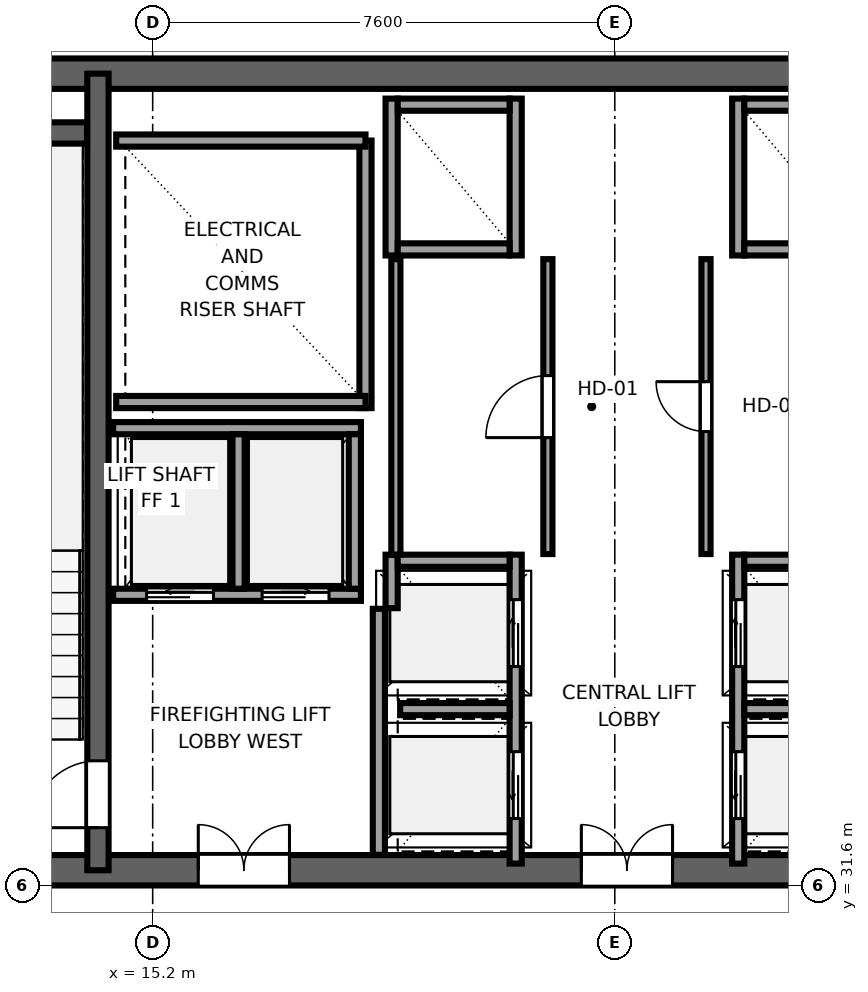
"""IFC4 building model, lengths in metres.
Left out: names, types, materials, properties, quantities, classifications, styles, units other than length and angle.
Written with IfcOpenShell. Run it as: python <this file> out.ifc"""

import sys

from ifc_helpers import new_model, si_unit, direction, frame, frame_2d, origin, place, context, subcontext, project, spatial, rectangle, extrude, source, transform, mapped, element, fill, save


model = new_model("IFC4")
c1 = context("Model", 3, precision=1e-05, world=origin(), true_north=direction((0.0, 1.0)))
c2 = subcontext(c1, "Body", "Model", "MODEL_VIEW")
j1 = project(units=[si_unit("LENGTHUNIT", "METRE"), si_unit("PLANEANGLEUNIT", "RADIAN")], contexts=[c1])
p1 = place(None, origin())
s1 = spatial("IfcSite", under=j1, at=p1, CompositionType="ELEMENT")
p2 = place(p1, origin())
s2 = spatial("IfcBuilding", under=s1, at=p2, CompositionType="ELEMENT")
p3 = place(p2, frame((0.0, 0.0, 259.4)))
s3 = spatial("IfcBuildingStorey", under=s2, at=p3, CompositionType="ELEMENT", Elevation=259.4)
p4 = place(p3, frame((10.0, 31.85, 0.0), z_axis=(0.0, 0.0, 1.0), x_axis=(1.0, 0.0, 0.0)))
e1 = element("IfcWall", 1, at=p4, inside=s3, PredefinedType="SHEAR", context=c2, shape_type="SweptSolid", body=[
    extrude(rectangle(XDim=26.0, YDim=0.5, at=frame_2d((13.0, 0.0))), origin(), (0.0, 0.0, 1.0), 3.55),
])
p5 = place(p4, frame((7.45, 0.0, 0.0), z_axis=(0.0, 0.0, 1.0), x_axis=(-1.0, 0.0, 0.0)))
e2 = element("IfcOpeningElement", 2, at=p5, cuts=e1, PredefinedType="OPENING", context=c2, shape_type="SweptSolid", body=[
    extrude(rectangle(XDim=1.5, YDim=2.04, at=frame_2d((0.75, 1.02))), frame((0.0, 0.26, 0.0), z_axis=(0.0, -1.0, 0.0), x_axis=(1.0, 0.0, 0.0)), (0.0, 0.0, 1.0), 0.52),
])
p6 = place(p4, frame((13.75, 0.0, 0.0), z_axis=(0.0, 0.0, 1.0), x_axis=(-1.0, 0.0, 0.0)))
e3 = element("IfcOpeningElement", 3, at=p6, cuts=e1, PredefinedType="OPENING", context=c2, shape_type="SweptSolid", body=[
    extrude(rectangle(XDim=1.5, YDim=2.04, at=frame_2d((0.75, 1.02))), frame((0.0, 0.26, 0.0), z_axis=(0.0, -1.0, 0.0), x_axis=(1.0, 0.0, 0.0)), (0.0, 0.0, 1.0), 0.52),
])
p7 = place(p4, frame((20.05, 0.0, 0.0), z_axis=(0.0, 0.0, 1.0), x_axis=(-1.0, 0.0, 0.0)))
e4 = element("IfcOpeningElement", 4, at=p7, cuts=e1, PredefinedType="OPENING", context=c2, shape_type="SweptSolid", body=[
    extrude(rectangle(XDim=1.5, YDim=2.04, at=frame_2d((0.75, 1.02))), frame((0.0, 0.26, 0.0), z_axis=(0.0, -1.0, 0.0), x_axis=(1.0, 0.0, 0.0)), (0.0, 0.0, 1.0), 0.52),
])
p8 = place(p3, frame((10.0, 44.95, 0.0), z_axis=(0.0, 0.0, 1.0), x_axis=(1.0, 0.0, 0.0)))
e5 = element("IfcWall", 5, at=p8, inside=s3, PredefinedType="SHEAR", context=c2, shape_type="SweptSolid", body=[
    extrude(rectangle(XDim=26.0, YDim=0.5, at=frame_2d((13.0, 0.0))), origin(), (0.0, 0.0, 1.0), 3.55),
])
p9 = place(p3, frame((14.3, 31.85, 0.0), z_axis=(0.0, 0.0, 1.0), x_axis=(0.0, 1.0, 0.0)))
e6 = element("IfcWall", 6, at=p9, inside=s3, PredefinedType="SHEAR", context=c2, shape_type="SweptSolid", body=[
    extrude(rectangle(XDim=13.1, YDim=0.35, at=frame_2d((6.55, 0.0))), origin(), (0.0, 0.0, 1.0), 3.55),
])
p10 = place(p9, frame((0.7, 0.0, 0.0)))
e7 = element("IfcOpeningElement", 7, at=p10, cuts=e6, PredefinedType="OPENING", context=c2, shape_type="SweptSolid", body=[
    extrude(rectangle(XDim=1.1, YDim=2.12, at=frame_2d((0.55, 1.06))), frame((0.0, 0.185, 0.0), z_axis=(0.0, -1.0, 0.0), x_axis=(1.0, 0.0, 0.0)), (0.0, 0.0, 1.0), 0.37),
])
p11 = place(p3, frame((10.52, 43.975, 0.0), z_axis=(0.0, 0.0, 1.0), x_axis=(1.0, 0.0, 0.0)))
e8 = element("IfcWall", 8, at=p11, inside=s3, PredefinedType="SHEAR", context=c2, shape_type="SweptSolid", body=[
    extrude(rectangle(XDim=3.6, YDim=0.35, at=frame_2d((1.8, 0.0))), origin(), (0.0, 0.0, 1.0), 3.55),
])
p12 = place(p3, frame((18.7, 39.45, 0.0), z_axis=(0.0, 0.0, 1.0), x_axis=(0.0, 1.0, 0.0)))
e9 = element("IfcWall", 9, at=p12, inside=s3, PredefinedType="SOLIDWALL", context=c2, shape_type="SweptSolid", body=[
    extrude(rectangle(XDim=4.4, YDim=0.2, at=frame_2d((2.2, 0.0))), origin(), (0.0, 0.0, 1.0), 3.37),
])
for number, where, z_axis, x_axis in (
    (10, (14.6, 39.55, 0.0), (0.0, 0.0, 1.0), (1.0, 0.0, 0.0)),
    (11, (14.6, 43.85, 0.0), (0.0, 0.0, 1.0), (1.0, 0.0, 0.0)),
):
    element("IfcWall", number, at=place(p3, frame(where, z_axis=z_axis, x_axis=x_axis)), inside=s3, PredefinedType="SOLIDWALL", context=c2, shape_type="SweptSolid", body=[
        extrude(rectangle(XDim=4.1, YDim=0.2, at=frame_2d((2.05, 0.0))), origin(), (0.0, 0.0, 1.0), 3.37),
    ])
p13 = place(p3, frame((18.92, 32.104, 0.0), z_axis=(0.0, 0.0, 1.0), x_axis=(0.0, 1.0, 0.0)))
e12 = element("IfcWall", 12, at=p13, inside=s3, PredefinedType="SOLIDWALL", context=c2, shape_type="SweptSolid", body=[
    extrude(rectangle(XDim=4.046, YDim=0.2, at=frame_2d((2.023, 0.0))), origin(), (0.0, 0.0, 1.0), 3.37),
])
p14 = place(p3, frame((21.17, 31.96, 0.0), z_axis=(0.0, 0.0, 1.0), x_axis=(0.0, 1.0, 0.0)))
e13 = element("IfcWall", 13, at=p14, inside=s3, PredefinedType="SOLIDWALL", context=c2, shape_type="SweptSolid", body=[
    extrude(rectangle(XDim=5.08, YDim=0.2, at=frame_2d((2.54, 0.0))), origin(), (0.0, 0.0, 1.0), 3.37),
])
p15 = place(p14, frame((0.74, 0.0, 0.0)))
e14 = element("IfcOpeningElement", 14, at=p15, cuts=e13, PredefinedType="OPENING", context=c2, shape_type="SweptSolid", body=[
    extrude(rectangle(XDim=1.1, YDim=2.12, at=frame_2d((0.55, 1.06))), frame((0.0, 0.11, 0.0), z_axis=(0.0, -1.0, 0.0), x_axis=(1.0, 0.0, 0.0)), (0.0, 0.0, 1.0), 0.22),
])
p16 = place(p14, frame((3.24, 0.0, 0.0)))
e15 = element("IfcOpeningElement", 15, at=p16, cuts=e13, PredefinedType="OPENING", context=c2, shape_type="SweptSolid", body=[
    extrude(rectangle(XDim=1.1, YDim=2.12, at=frame_2d((0.55, 1.06))), frame((0.0, 0.11, 0.0), z_axis=(0.0, -1.0, 0.0), x_axis=(1.0, 0.0, 0.0)), (0.0, 0.0, 1.0), 0.22),
])
p17 = place(p3, frame((19.13, 36.16, 0.0), z_axis=(0.0, 0.0, 1.0), x_axis=(0.0, 1.0, 0.0)))
e16 = element("IfcWall", 16, at=p17, inside=s3, PredefinedType="SOLIDWALL", context=c2, shape_type="SweptSolid", body=[
    extrude(rectangle(XDim=0.88, YDim=0.2, at=frame_2d((0.44, 0.0))), origin(), (0.0, 0.0, 1.0), 3.37),
])
p18 = place(p3, frame((19.23, 36.94, 0.0), z_axis=(0.0, 0.0, 1.0), x_axis=(1.0, 0.0, 0.0)))
e17 = element("IfcWall", 17, at=p18, inside=s3, PredefinedType="SOLIDWALL", context=c2, shape_type="SweptSolid", body=[
    extrude(rectangle(XDim=1.84, YDim=0.2, at=frame_2d((0.92, 0.0))), origin(), (0.0, 0.0, 1.0), 3.37),
])
p19 = place(p3, frame((19.27, 34.5, 0.0), z_axis=(0.0, 0.0, 1.0), x_axis=(1.0, 0.0, 0.0)))
e18 = element("IfcWall", 18, at=p19, inside=s3, PredefinedType="SOLIDWALL", context=c2, shape_type="SweptSolid", body=[
    extrude(rectangle(XDim=1.8, YDim=0.2, at=frame_2d((0.9, 0.0))), origin(), (0.0, 0.0, 1.0), 3.37),
])
for number, where, z_axis, x_axis in (
    (19, (21.17, 41.96, 0.0), (0.0, 0.0, 1.0), (0.0, 1.0, 0.0)),
    (20, (19.13, 41.96, 0.0), (0.0, 0.0, 1.0), (0.0, 1.0, 0.0)),
):
    element("IfcWall", number, at=place(p3, frame(where, z_axis=z_axis, x_axis=x_axis)), inside=s3, PredefinedType="SOLIDWALL", context=c2, shape_type="SweptSolid", body=[
        extrude(rectangle(XDim=2.58, YDim=0.2, at=frame_2d((1.29, 0.0))), origin(), (0.0, 0.0, 1.0), 3.37),
    ])
for number, where, z_axis, x_axis in (
    (21, (19.23, 42.06, 0.0), (0.0, 0.0, 1.0), (1.0, 0.0, 0.0)),
    (22, (19.23, 44.44, 0.0), (0.0, 0.0, 1.0), (1.0, 0.0, 0.0)),
):
    element("IfcWall", number, at=place(p3, frame(where, z_axis=z_axis, x_axis=x_axis)), inside=s3, PredefinedType="SOLIDWALL", context=c2, shape_type="SweptSolid", body=[
        extrude(rectangle(XDim=1.84, YDim=0.2, at=frame_2d((0.92, 0.0))), origin(), (0.0, 0.0, 1.0), 3.37),
    ])
p20 = place(p3, frame((14.55, 36.38, 0.0), z_axis=(0.0, 0.0, 1.0), x_axis=(1.0, 0.0, 0.0)))
e23 = element("IfcWall", 23, at=p20, inside=s3, PredefinedType="SOLIDWALL", context=c2, shape_type="SweptSolid", body=[
    extrude(rectangle(XDim=4.075, YDim=0.2, at=frame_2d((2.038, 0.0))), origin(), (0.0, 0.0, 1.0), 3.37),
])
p21 = place(p20, frame((0.55, 0.0, 0.0)))
e24 = element("IfcOpeningElement", 24, at=p21, cuts=e23, PredefinedType="OPENING", context=c2, shape_type="SweptSolid", body=[
    extrude(rectangle(XDim=1.1, YDim=2.12, at=frame_2d((0.55, 1.06))), frame((0.0, 0.11, 0.0), z_axis=(0.0, -1.0, 0.0), x_axis=(1.0, 0.0, 0.0)), (0.0, 0.0, 1.0), 0.22),
])
p22 = place(p20, frame((2.45, 0.0, 0.0)))
e25 = element("IfcOpeningElement", 25, at=p22, cuts=e23, PredefinedType="OPENING", context=c2, shape_type="SweptSolid", body=[
    extrude(rectangle(XDim=1.1, YDim=2.12, at=frame_2d((0.55, 1.06))), frame((0.0, 0.11, 0.0), z_axis=(0.0, -1.0, 0.0), x_axis=(1.0, 0.0, 0.0)), (0.0, 0.0, 1.0), 0.22),
])
p23 = place(p3, frame((14.55, 39.12, 0.0), z_axis=(0.0, 0.0, 1.0), x_axis=(1.0, 0.0, 0.0)))
e26 = element("IfcWall", 26, at=p23, inside=s3, PredefinedType="SOLIDWALL", context=c2, shape_type="SweptSolid", body=[
    extrude(rectangle(XDim=4.075, YDim=0.2, at=frame_2d((2.038, 0.0))), origin(), (0.0, 0.0, 1.0), 3.37),
])
for number, where, z_axis, x_axis in (
    (27, (18.525, 36.48, 0.0), (0.0, 0.0, 1.0), (0.0, 1.0, 0.0)),
    (28, (16.613, 36.48, 0.0), (0.0, 0.0, 1.0), (0.0, 1.0, 0.0)),
):
    element("IfcWall", number, at=place(p3, frame(where, z_axis=z_axis, x_axis=x_axis)), inside=s3, PredefinedType="SOLIDWALL", context=c2, shape_type="SweptSolid", body=[
        extrude(rectangle(XDim=2.54, YDim=0.2, at=frame_2d((1.27, 0.0))), origin(), (0.0, 0.0, 1.0), 3.37),
    ])
p24 = place(p3, frame((24.83, 31.96, 0.0), z_axis=(0.0, 0.0, 1.0), x_axis=(0.0, 1.0, 0.0)))
e29 = element("IfcWall", 29, at=p24, inside=s3, PredefinedType="SOLIDWALL", context=c2, shape_type="SweptSolid", body=[
    extrude(rectangle(XDim=5.08, YDim=0.2, at=frame_2d((2.54, 0.0))), origin(), (0.0, 0.0, 1.0), 3.37),
])
p25 = place(p24, frame((0.74, 0.0, 0.0)))
e30 = element("IfcOpeningElement", 30, at=p25, cuts=e29, PredefinedType="OPENING", context=c2, shape_type="SweptSolid", body=[
    extrude(rectangle(XDim=1.1, YDim=2.12, at=frame_2d((0.55, 1.06))), frame((0.0, 0.11, 0.0), z_axis=(0.0, -1.0, 0.0), x_axis=(1.0, 0.0, 0.0)), (0.0, 0.0, 1.0), 0.22),
])
p26 = place(p24, frame((3.24, 0.0, 0.0)))
e31 = element("IfcOpeningElement", 31, at=p26, cuts=e29, PredefinedType="OPENING", context=c2, shape_type="SweptSolid", body=[
    extrude(rectangle(XDim=1.1, YDim=2.12, at=frame_2d((0.55, 1.06))), frame((0.0, 0.11, 0.0), z_axis=(0.0, -1.0, 0.0), x_axis=(1.0, 0.0, 0.0)), (0.0, 0.0, 1.0), 0.22),
])
p27 = place(p3, frame((24.93, 36.94, 0.0), z_axis=(0.0, 0.0, 1.0), x_axis=(1.0, 0.0, 0.0)))
e32 = element("IfcWall", 32, at=p27, inside=s3, PredefinedType="SOLIDWALL", context=c2, shape_type="SweptSolid", body=[
    extrude(rectangle(XDim=1.84, YDim=0.2, at=frame_2d((0.92, 0.0))), origin(), (0.0, 0.0, 1.0), 3.37),
])
p28 = place(p3, frame((24.93, 34.5, 0.0), z_axis=(0.0, 0.0, 1.0), x_axis=(1.0, 0.0, 0.0)))
e33 = element("IfcWall", 33, at=p28, inside=s3, PredefinedType="SOLIDWALL", context=c2, shape_type="SweptSolid", body=[
    extrude(rectangle(XDim=1.8, YDim=0.2, at=frame_2d((0.9, 0.0))), origin(), (0.0, 0.0, 1.0), 3.37),
])
p29 = place(p3, frame((24.83, 41.96, 0.0), z_axis=(0.0, 0.0, 1.0), x_axis=(0.0, 1.0, 0.0)))
e34 = element("IfcWall", 34, at=p29, inside=s3, PredefinedType="SOLIDWALL", context=c2, shape_type="SweptSolid", body=[
    extrude(rectangle(XDim=2.58, YDim=0.2, at=frame_2d((1.29, 0.0))), origin(), (0.0, 0.0, 1.0), 3.37),
])
for number, where, z_axis, x_axis in (
    (35, (24.93, 42.06, 0.0), (0.0, 0.0, 1.0), (1.0, 0.0, 0.0)),
    (36, (24.93, 44.44, 0.0), (0.0, 0.0, 1.0), (1.0, 0.0, 0.0)),
):
    element("IfcWall", number, at=place(p3, frame(where, z_axis=z_axis, x_axis=x_axis)), inside=s3, PredefinedType="SOLIDWALL", context=c2, shape_type="SweptSolid", body=[
        extrude(rectangle(XDim=1.84, YDim=0.2, at=frame_2d((0.92, 0.0))), origin(), (0.0, 0.0, 1.0), 3.37),
    ])
p30 = place(p3, frame((21.7, 37.05, 0.0), z_axis=(0.0, 0.0, 1.0), x_axis=(0.0, 1.0, 0.0)))
e37 = element("IfcWall", 37, at=p30, inside=s3, PredefinedType="PARTITIONING", context=c2, shape_type="SweptSolid", body=[
    extrude(rectangle(XDim=4.85, YDim=0.15, at=frame_2d((2.425, 0.0))), origin(), (0.0, 0.0, 1.0), 3.37),
])
p31 = place(p30, frame((1.915, 0.0, 0.0)))
e38 = element("IfcOpeningElement", 38, at=p31, cuts=e37, PredefinedType="OPENING", context=c2, shape_type="SweptSolid", body=[
    extrude(rectangle(XDim=1.02, YDim=2.03, at=frame_2d((0.51, 1.015))), frame((0.0, 0.085, 0.0), z_axis=(0.0, -1.0, 0.0), x_axis=(1.0, 0.0, 0.0)), (0.0, 0.0, 1.0), 0.17),
])
p32 = place(p3, frame((19.2, 37.04, 0.0), z_axis=(0.0, 0.0, 1.0), x_axis=(0.0, 1.0, 0.0)))
e39 = element("IfcWall", 39, at=p32, inside=s3, PredefinedType="PARTITIONING", context=c2, shape_type="SweptSolid", body=[
    extrude(rectangle(XDim=4.86, YDim=0.15, at=frame_2d((2.43, 0.0))), origin(), (0.0, 0.0, 1.0), 3.37),
])
p33 = place(p3, frame((24.3, 37.05, 0.0), z_axis=(0.0, 0.0, 1.0), x_axis=(0.0, 1.0, 0.0)))
e40 = element("IfcWall", 40, at=p33, inside=s3, PredefinedType="PARTITIONING", context=c2, shape_type="SweptSolid", body=[
    extrude(rectangle(XDim=4.85, YDim=0.15, at=frame_2d((2.425, 0.0))), origin(), (0.0, 0.0, 1.0), 3.37),
])
p34 = place(p33, frame((2.015, 0.0, 0.0)))
e41 = element("IfcOpeningElement", 41, at=p34, cuts=e40, PredefinedType="OPENING", context=c2, shape_type="SweptSolid", body=[
    extrude(rectangle(XDim=0.82, YDim=2.01, at=frame_2d((0.41, 1.005))), frame((0.0, 0.085, 0.0), z_axis=(0.0, -1.0, 0.0), x_axis=(1.0, 0.0, 0.0)), (0.0, 0.0, 1.0), 0.17),
])
m1 = source(origin(), c2, "Body", "SweptSolid", [
    extrude(rectangle(XDim=1.1, YDim=2.12, at=frame_2d((0.55, 1.06))), frame((0.0, 0.025, 0.0), z_axis=(0.0, -1.0, 0.0), x_axis=(1.0, 0.0, 0.0)), (0.0, 0.0, 1.0), 0.05),
])
p35 = place(p10, origin())
e42 = element("IfcDoor", 42, at=p35, inside=s3, OperationType="SINGLE_SWING_LEFT", PredefinedType="DOOR", context=c2, shape_type="MappedRepresentation", body=[
    mapped(m1, transform((0.0, 0.0, 0.0), x_axis=(1.0, 0.0, 0.0), y_axis=(0.0, 1.0, 0.0), z_axis=(0.0, 0.0, 1.0), scale=1.0)),
])
fill(e7, e42)
m2 = source(origin(), c2, "Body", "SweptSolid", [
    extrude(rectangle(XDim=1.5, YDim=2.04, at=frame_2d((0.75, 1.02))), frame((0.0, 0.025, 0.0), z_axis=(0.0, -1.0, 0.0), x_axis=(1.0, 0.0, 0.0)), (0.0, 0.0, 1.0), 0.05),
])
p36 = place(p5, origin())
e43 = element("IfcDoor", 43, at=p36, inside=s3, OperationType="DOUBLE_DOOR_SINGLE_SWING", PredefinedType="DOOR", context=c2, shape_type="MappedRepresentation", body=[
    mapped(m2, transform((0.0, 0.0, 0.0), x_axis=(1.0, 0.0, 0.0), y_axis=(0.0, 1.0, 0.0), z_axis=(0.0, 0.0, 1.0), scale=1.0)),
])
fill(e2, e43)
p37 = place(p6, origin())
e44 = element("IfcDoor", 44, at=p37, inside=s3, OperationType="DOUBLE_DOOR_SINGLE_SWING", PredefinedType="DOOR", context=c2, shape_type="MappedRepresentation", body=[
    mapped(m2, transform((0.0, 0.0, 0.0), x_axis=(1.0, 0.0, 0.0), y_axis=(0.0, 1.0, 0.0), z_axis=(0.0, 0.0, 1.0), scale=1.0)),
])
fill(e3, e44)
m3 = source(origin(), c2, "Body", "SweptSolid", [
    extrude(rectangle(XDim=1.1, YDim=2.12, at=frame_2d((0.55, 1.06))), frame((0.0, 0.025, 0.0), z_axis=(0.0, -1.0, 0.0), x_axis=(1.0, 0.0, 0.0)), (0.0, 0.0, 1.0), 0.05),
])
p38 = place(p15, origin())
e45 = element("IfcDoor", 45, at=p38, inside=s3, OperationType="SLIDING_TO_LEFT", PredefinedType="DOOR", context=c2, shape_type="MappedRepresentation", body=[
    mapped(m3, transform((0.0, 0.0, 0.0), x_axis=(1.0, 0.0, 0.0), y_axis=(0.0, 1.0, 0.0), z_axis=(0.0, 0.0, 1.0), scale=1.0)),
])
fill(e14, e45)
p39 = place(p16, origin())
e46 = element("IfcDoor", 46, at=p39, inside=s3, OperationType="SLIDING_TO_RIGHT", PredefinedType="DOOR", context=c2, shape_type="MappedRepresentation", body=[
    mapped(m3, transform((0.0, 0.0, 0.0), x_axis=(1.0, 0.0, 0.0), y_axis=(0.0, 1.0, 0.0), z_axis=(0.0, 0.0, 1.0), scale=1.0)),
])
fill(e15, e46)
p40 = place(p21, origin())
e47 = element("IfcDoor", 47, at=p40, inside=s3, OperationType="SLIDING_TO_LEFT", PredefinedType="DOOR", context=c2, shape_type="MappedRepresentation", body=[
    mapped(m3, transform((0.0, 0.0, 0.0), x_axis=(1.0, 0.0, 0.0), y_axis=(0.0, 1.0, 0.0), z_axis=(0.0, 0.0, 1.0), scale=1.0)),
])
fill(e24, e47)
p41 = place(p22, origin())
e48 = element("IfcDoor", 48, at=p41, inside=s3, OperationType="SLIDING_TO_RIGHT", PredefinedType="DOOR", context=c2, shape_type="MappedRepresentation", body=[
    mapped(m3, transform((0.0, 0.0, 0.0), x_axis=(1.0, 0.0, 0.0), y_axis=(0.0, 1.0, 0.0), z_axis=(0.0, 0.0, 1.0), scale=1.0)),
])
fill(e25, e48)
p42 = place(p25, origin())
e49 = element("IfcDoor", 49, at=p42, inside=s3, OperationType="SLIDING_TO_LEFT", PredefinedType="DOOR", context=c2, shape_type="MappedRepresentation", body=[
    mapped(m3, transform((0.0, 0.0, 0.0), x_axis=(1.0, 0.0, 0.0), y_axis=(0.0, 1.0, 0.0), z_axis=(0.0, 0.0, 1.0), scale=1.0)),
])
fill(e30, e49)
p43 = place(p26, origin())
e50 = element("IfcDoor", 50, at=p43, inside=s3, OperationType="SLIDING_TO_RIGHT", PredefinedType="DOOR", context=c2, shape_type="MappedRepresentation", body=[
    mapped(m3, transform((0.0, 0.0, 0.0), x_axis=(1.0, 0.0, 0.0), y_axis=(0.0, 1.0, 0.0), z_axis=(0.0, 0.0, 1.0), scale=1.0)),
])
fill(e31, e50)
m4 = source(origin(), c2, "Body", "SweptSolid", [
    extrude(rectangle(XDim=1.02, YDim=2.03, at=frame_2d((0.51, 1.015))), frame((0.0, 0.025, 0.0), z_axis=(0.0, -1.0, 0.0), x_axis=(1.0, 0.0, 0.0)), (0.0, 0.0, 1.0), 0.05),
])
p44 = place(p31, origin())
e51 = element("IfcDoor", 51, at=p44, inside=s3, OperationType="SINGLE_SWING_LEFT", PredefinedType="DOOR", context=c2, shape_type="MappedRepresentation", body=[
    mapped(m4, transform((0.0, 0.0, 0.0), x_axis=(1.0, 0.0, 0.0), y_axis=(0.0, 1.0, 0.0), z_axis=(0.0, 0.0, 1.0), scale=1.0)),
])
fill(e38, e51)
m5 = source(origin(), c2, "Body", "SweptSolid", [
    extrude(rectangle(XDim=0.82, YDim=2.01, at=frame_2d((0.41, 1.005))), frame((0.0, 0.025, 0.0), z_axis=(0.0, -1.0, 0.0), x_axis=(1.0, 0.0, 0.0)), (0.0, 0.0, 1.0), 0.05),
])
p45 = place(p34, origin())
e52 = element("IfcDoor", 52, at=p45, inside=s3, OperationType="SINGLE_SWING_RIGHT", PredefinedType="DOOR", context=c2, shape_type="MappedRepresentation", body=[
    mapped(m5, transform((0.0, 0.0, 0.0), x_axis=(1.0, 0.0, 0.0), y_axis=(0.0, 1.0, 0.0), z_axis=(0.0, 0.0, 1.0), scale=1.0)),
])
fill(e41, e52)
save(model, sys.argv[1])
